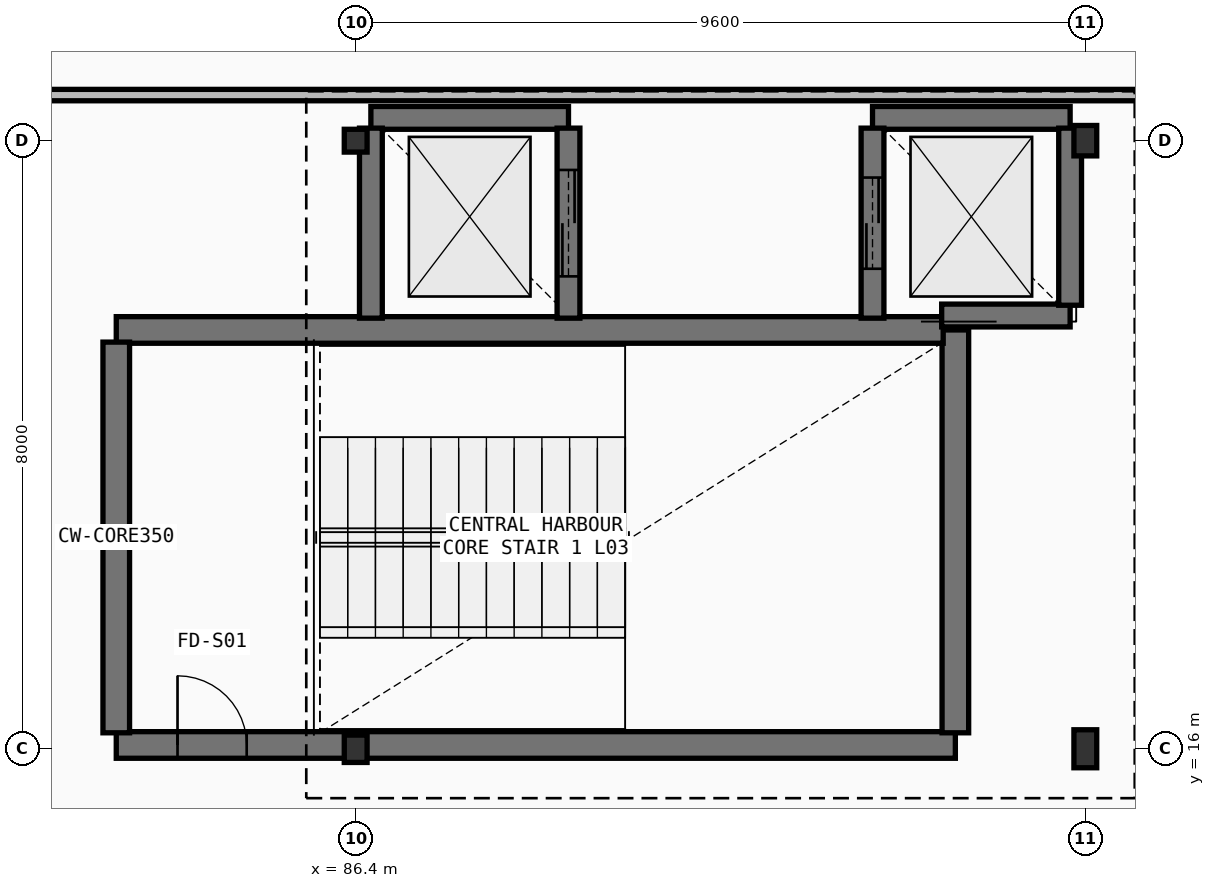
"""IFC4 building model, lengths in metres.
Left out: names, types, materials, properties, quantities, classifications, styles, units other than length and angle.
Written with IfcOpenShell. Run it as: python <this file> out.ifc"""

import sys

from ifc_helpers import new_model, si_unit, direction, frame, frame_2d, origin, origin_2d, place, context, subcontext, project, spatial, rectangle, i_section, extrude, element, fill, save


model = new_model("IFC4")
c1 = context("Model", 3, precision=1e-05, world=origin(), true_north=direction((0.0, 1.0)))
c2 = subcontext(c1, "Body", "Model", "MODEL_VIEW")
j1 = project(units=[si_unit("LENGTHUNIT", "METRE"), si_unit("PLANEANGLEUNIT", "RADIAN")], contexts=[c1])
p1 = place(None, origin())
s1 = spatial("IfcSite", under=j1, at=p1, CompositionType="ELEMENT")
p2 = place(p1, origin())
s2 = spatial("IfcBuilding", under=s1, at=p2, CompositionType="ELEMENT")
p3 = place(p2, frame((0.0, 0.0, 15.9)))
s3 = spatial("IfcBuildingStorey", under=s2, at=p3, CompositionType="ELEMENT", Elevation=15.9)
p4 = place(p3, frame((86.4, 16.0, 0.0), z_axis=(0.0, 0.0, 1.0), x_axis=(1.0, 0.0, 0.0)))
e1 = element("IfcColumn", 1, at=p4, inside=s3, PredefinedType="COLUMN", context=c2, shape_type="SweptSolid", body=[
    extrude(i_section(OverallWidth=0.3, OverallDepth=0.36, WebThickness=0.012, FlangeThickness=0.022, FilletRadius=0.027, at=origin_2d()), origin(), (0.0, 0.0, 1.0), 4.5),
])
p5 = place(p3, frame((86.4, 24.0, 0.0), z_axis=(0.0, 0.0, 1.0), x_axis=(1.0, 0.0, 0.0)))
e2 = element("IfcColumn", 2, at=p5, inside=s3, PredefinedType="COLUMN", context=c2, shape_type="SweptSolid", body=[
    extrude(i_section(OverallWidth=0.3, OverallDepth=0.3, WebThickness=0.011, FlangeThickness=0.019, FilletRadius=0.027, at=origin_2d()), origin(), (0.0, 0.0, 1.0), 4.5),
])
p6 = place(p3, frame((96.0, 16.0, 0.0), z_axis=(0.0, 0.0, 1.0), x_axis=(1.0, 0.0, 0.0)))
e3 = element("IfcColumn", 3, at=p6, inside=s3, PredefinedType="COLUMN", context=c2, shape_type="SweptSolid", body=[
    extrude(i_section(OverallWidth=0.3, OverallDepth=0.5, WebThickness=0.014, FlangeThickness=0.028, FilletRadius=0.027, at=origin_2d()), origin(), (0.0, 0.0, 1.0), 4.5),
])
p7 = place(p3, frame((96.0, 24.0, 0.0), z_axis=(0.0, 0.0, 1.0), x_axis=(1.0, 0.0, 0.0)))
e4 = element("IfcColumn", 4, at=p7, inside=s3, PredefinedType="COLUMN", context=c2, shape_type="SweptSolid", body=[
    extrude(i_section(OverallWidth=0.3, OverallDepth=0.4, WebThickness=0.013, FlangeThickness=0.024, FilletRadius=0.027, at=origin_2d()), origin(), (0.0, 0.0, 1.0), 4.5),
])
p8 = place(p3, frame((83.25, 16.05, 0.0), z_axis=(0.0, 0.0, 1.0), x_axis=(1.0, 0.0, 0.0)))
e5 = element("IfcWall", 5, at=p8, inside=s3, PredefinedType="SHEAR", context=c2, shape_type="SweptSolid", body=[
    extrude(rectangle(XDim=11.04, YDim=0.35, at=frame_2d((5.52, 0.0))), origin(), (0.0, 0.0, 1.0), 4.276),
])
p9 = place(p8, frame((0.806, 0.0, 0.0)))
e6 = element("IfcOpeningElement", 6, at=p9, cuts=e5, PredefinedType="OPENING", context=c2, shape_type="SweptSolid", body=[
    extrude(rectangle(XDim=0.91, YDim=2.08, at=frame_2d((0.455, 1.04))), frame((0.0, 0.185, 0.0), z_axis=(0.0, -1.0, 0.0), x_axis=(1.0, 0.0, 0.0)), (0.0, 0.0, 1.0), 0.37),
])
p10 = place(p3, frame((94.29, 16.21, 0.0), z_axis=(0.0, 0.0, 1.0), x_axis=(0.0, 1.0, 0.0)))
e7 = element("IfcWall", 7, at=p10, inside=s3, PredefinedType="SHEAR", context=c2, shape_type="SweptSolid", body=[
    extrude(rectangle(XDim=5.3, YDim=0.35, at=frame_2d((2.65, 0.0))), origin(), (0.0, 0.0, 1.0), 4.276),
])
p11 = place(p3, frame((94.13, 21.51, 0.0), z_axis=(0.0, 0.0, 1.0), x_axis=(-1.0, 0.0, 0.0)))
e8 = element("IfcWall", 8, at=p11, inside=s3, PredefinedType="SHEAR", context=c2, shape_type="SweptSolid", body=[
    extrude(rectangle(XDim=10.88, YDim=0.35, at=frame_2d((5.44, 0.0))), origin(), (0.0, 0.0, 1.0), 4.276),
])
p12 = place(p3, frame((83.25, 21.35, 0.0), z_axis=(0.0, 0.0, 1.0), x_axis=(0.0, -1.0, 0.0)))
e9 = element("IfcWall", 9, at=p12, inside=s3, PredefinedType="SHEAR", context=c2, shape_type="SweptSolid", body=[
    extrude(rectangle(XDim=5.14, YDim=0.35, at=frame_2d((2.57, 0.0))), origin(), (0.0, 0.0, 1.0), 4.276),
])
p13 = place(p3, frame((89.2, 24.3, 0.0), z_axis=(0.0, 0.0, 1.0), x_axis=(-1.0, 0.0, 0.0)))
e10 = element("IfcWall", 10, at=p13, inside=s3, PredefinedType="SHEAR", context=c2, shape_type="SweptSolid", body=[
    extrude(rectangle(XDim=2.6, YDim=0.3, at=frame_2d((1.3, 0.0))), origin(), (0.0, 0.0, 1.0), 4.276),
])
p14 = place(p3, frame((89.2, 21.665, 0.0), z_axis=(0.0, 0.0, 1.0), x_axis=(0.0, 1.0, 0.0)))
e11 = element("IfcWall", 11, at=p14, inside=s3, PredefinedType="SHEAR", context=c2, shape_type="SweptSolid", body=[
    extrude(rectangle(XDim=2.5, YDim=0.3, at=frame_2d((1.25, 0.0))), origin(), (0.0, 0.0, 1.0), 4.276),
])
p15 = place(p14, frame((0.55, 0.0, 0.0)))
e12 = element("IfcOpeningElement", 12, at=p15, cuts=e11, PredefinedType="OPENING", context=c2, shape_type="SweptSolid", body=[
    extrude(rectangle(XDim=1.4, YDim=2.26, at=frame_2d((0.7, 1.13))), frame((0.0, 0.16, 0.0), z_axis=(0.0, -1.0, 0.0), x_axis=(1.0, 0.0, 0.0)), (0.0, 0.0, 1.0), 0.32),
])
p16 = place(p3, frame((86.6, 24.165, 0.0), z_axis=(0.0, 0.0, 1.0), x_axis=(0.0, -1.0, 0.0)))
e13 = element("IfcWall", 13, at=p16, inside=s3, PredefinedType="SHEAR", context=c2, shape_type="SweptSolid", body=[
    extrude(rectangle(XDim=2.5, YDim=0.3, at=frame_2d((1.25, 0.0))), origin(), (0.0, 0.0, 1.0), 4.276),
])
p17 = place(p3, frame((95.8, 24.3, 0.0), z_axis=(0.0, 0.0, 1.0), x_axis=(-1.0, 0.0, 0.0)))
e14 = element("IfcWall", 14, at=p17, inside=s3, PredefinedType="SHEAR", context=c2, shape_type="SweptSolid", body=[
    extrude(rectangle(XDim=2.6, YDim=0.3, at=frame_2d((1.3, 0.0))), origin(), (0.0, 0.0, 1.0), 4.276),
])
p18 = place(p3, frame((94.11, 21.7, 0.0), z_axis=(0.0, 0.0, 1.0), x_axis=(1.0, 0.0, 0.0)))
e15 = element("IfcWall", 15, at=p18, inside=s3, PredefinedType="SHEAR", context=c2, shape_type="SweptSolid", body=[
    extrude(rectangle(XDim=1.69, YDim=0.3, at=frame_2d((0.845, 0.0))), origin(), (0.0, 0.0, 1.0), 4.276),
])
p19 = place(p3, frame((95.8, 21.835, 0.0), z_axis=(0.0, 0.0, 1.0), x_axis=(0.0, 1.0, 0.0)))
e16 = element("IfcWall", 16, at=p19, inside=s3, PredefinedType="SHEAR", context=c2, shape_type="SweptSolid", body=[
    extrude(rectangle(XDim=2.33, YDim=0.3, at=frame_2d((1.165, 0.0))), origin(), (0.0, 0.0, 1.0), 4.276),
])
p20 = place(p3, frame((93.2, 24.165, 0.0), z_axis=(0.0, 0.0, 1.0), x_axis=(0.0, -1.0, 0.0)))
e17 = element("IfcWall", 17, at=p20, inside=s3, PredefinedType="SHEAR", context=c2, shape_type="SweptSolid", body=[
    extrude(rectangle(XDim=2.5, YDim=0.3, at=frame_2d((1.25, 0.0))), origin(), (0.0, 0.0, 1.0), 4.276),
])
p21 = place(p20, frame((0.65, 0.0, 0.0)))
e18 = element("IfcOpeningElement", 18, at=p21, cuts=e17, PredefinedType="OPENING", context=c2, shape_type="SweptSolid", body=[
    extrude(rectangle(XDim=1.2, YDim=2.2, at=frame_2d((0.6, 1.1))), frame((0.0, 0.16, 0.0), z_axis=(0.0, -1.0, 0.0), x_axis=(1.0, 0.0, 0.0)), (0.0, 0.0, 1.0), 0.32),
])
p22 = place(p3, frame((82.0, 24.6, 0.0), z_axis=(0.0, 0.0, 1.0), x_axis=(1.0, 0.0, 0.0)))
e19 = element("IfcWall", 19, at=p22, inside=s3, PredefinedType="PARTITIONING", context=c2, shape_type="SweptSolid", body=[
    extrude(rectangle(XDim=32.6, YDim=0.15, at=frame_2d((16.3, 0.0))), origin(), (0.0, 0.0, 1.0), 3.346),
])
p23 = place(p22, frame((15.75, 0.0, 0.0)))
e20 = element("IfcOpeningElement", 20, at=p23, cuts=e19, PredefinedType="OPENING", context=c2, shape_type="SweptSolid", body=[
    extrude(rectangle(XDim=1.1, YDim=2.28, at=frame_2d((0.55, 1.14))), frame((0.0, 0.085, 0.0), z_axis=(0.0, -1.0, 0.0), x_axis=(1.0, 0.0, 0.0)), (0.0, 0.0, 1.0), 0.17),
])
p24 = place(p9, origin())
e21 = element("IfcDoor", 21, at=p24, inside=s3, OperationType="SINGLE_SWING_LEFT", PredefinedType="DOOR", context=c2, shape_type="SweptSolid", body=[
    extrude(rectangle(XDim=0.91, YDim=2.08, at=frame_2d((0.455, 1.04))), frame((0.0, 0.025, 0.0), z_axis=(0.0, -1.0, 0.0), x_axis=(1.0, 0.0, 0.0)), (0.0, 0.0, 1.0), 0.05),
])
fill(e6, e21)
p25 = place(p15, origin())
e22 = element("IfcDoor", 22, at=p25, inside=s3, OperationType="DOUBLE_DOOR_SLIDING", PredefinedType="DOOR", context=c2, shape_type="SweptSolid", body=[
    extrude(rectangle(XDim=1.4, YDim=2.26, at=frame_2d((0.7, 1.13))), frame((0.0, 0.025, 0.0), z_axis=(0.0, -1.0, 0.0), x_axis=(1.0, 0.0, 0.0)), (0.0, 0.0, 1.0), 0.05),
])
fill(e12, e22)
p26 = place(p21, origin())
e23 = element("IfcDoor", 23, at=p26, inside=s3, OperationType="DOUBLE_DOOR_SLIDING", PredefinedType="DOOR", context=c2, shape_type="SweptSolid", body=[
    extrude(rectangle(XDim=1.2, YDim=2.2, at=frame_2d((0.6, 1.1))), frame((0.0, 0.025, 0.0), z_axis=(0.0, -1.0, 0.0), x_axis=(1.0, 0.0, 0.0)), (0.0, 0.0, 1.0), 0.05),
])
fill(e18, e23)
save(model, sys.argv[1])
